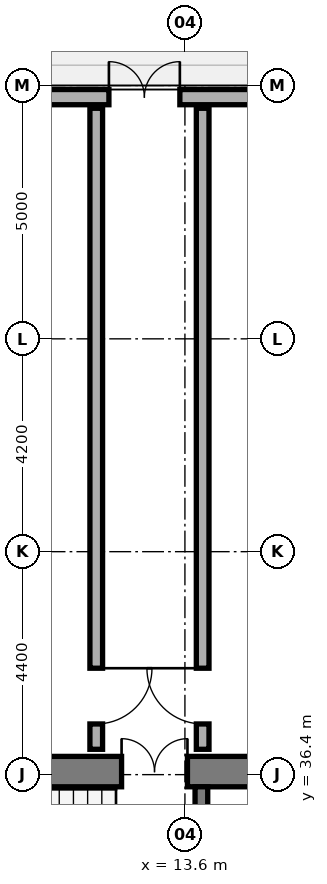
"""IFC4 building model, lengths in metres.
Left out: names, types, materials, properties, quantities, classifications, styles, units other than length and angle.
Written with IfcOpenShell. Run it as: python <this file> out.ifc"""

import sys

from ifc_helpers import new_model, si_unit, direction, frame, frame_2d, origin, place, context, subcontext, project, spatial, rectangle, extrude, element, fill, save


model = new_model("IFC4")
c1 = context("Model", 3, precision=1e-05, world=origin(), true_north=direction((0.0, 1.0)))
c2 = subcontext(c1, "Body", "Model", "MODEL_VIEW")
j1 = project(units=[si_unit("LENGTHUNIT", "METRE"), si_unit("PLANEANGLEUNIT", "RADIAN")], contexts=[c1])
p1 = place(None, origin())
s1 = spatial("IfcSite", under=j1, at=p1, CompositionType="ELEMENT")
p2 = place(p1, origin())
s2 = spatial("IfcBuilding", under=s1, at=p2, CompositionType="ELEMENT")
p3 = place(p2, origin())
s3 = spatial("IfcBuildingStorey", under=s2, at=p3, CompositionType="ELEMENT", Elevation=0.0)
p4 = place(p3, frame((6.2, 36.46, 0.0), z_axis=(0.0, 0.0, 1.0), x_axis=(1.0, 0.0, 0.0)))
e1 = element("IfcWall", 1, at=p4, inside=s3, PredefinedType="SHEAR", context=c2, shape_type="SweptSolid", body=[
    extrude(rectangle(XDim=24.8, YDim=0.6, at=frame_2d((12.4, 0.0))), origin(), (0.0, 0.0, 1.0), 5.4),
])
p5 = place(p4, frame((9.35, 0.0, 0.0)))
e2 = element("IfcOpeningElement", 2, at=p5, cuts=e1, PredefinedType="OPENING", context=c2, shape_type="SweptSolid", body=[
    extrude(rectangle(XDim=1.2, YDim=2.15, at=frame_2d((0.6, 1.075))), frame((0.0, 0.31, 0.0), z_axis=(0.0, -1.0, 0.0), x_axis=(1.0, 0.0, 0.0)), (0.0, 0.0, 1.0), 0.62),
])
p6 = place(p4, frame((6.15, 0.0, 0.0)))
e3 = element("IfcOpeningElement", 3, at=p6, cuts=e1, PredefinedType="OPENING", context=c2, shape_type="SweptSolid", body=[
    extrude(rectangle(XDim=1.3, YDim=2.15, at=frame_2d((0.65, 1.075))), frame((0.0, 0.31, 0.0), z_axis=(0.0, -1.0, 0.0), x_axis=(1.0, 0.0, 0.0)), (0.0, 0.0, 1.0), 0.62),
])
p7 = place(p4, frame((17.14, 0.0, 0.0)))
e4 = element("IfcOpeningElement", 4, at=p7, cuts=e1, PredefinedType="OPENING", context=c2, shape_type="SweptSolid", body=[
    extrude(rectangle(XDim=0.85, YDim=2.1, at=frame_2d((0.425, 1.05))), frame((0.0, 0.31, 0.0), z_axis=(0.0, -1.0, 0.0), x_axis=(1.0, 0.0, 0.0)), (0.0, 0.0, 1.0), 0.62),
])
p8 = place(p4, frame((18.983, 0.0, 0.0)))
e5 = element("IfcOpeningElement", 5, at=p8, cuts=e1, PredefinedType="OPENING", context=c2, shape_type="SweptSolid", body=[
    extrude(rectangle(XDim=1.1, YDim=2.15, at=frame_2d((0.55, 1.075))), frame((0.0, 0.31, 0.0), z_axis=(0.0, -1.0, 0.0), x_axis=(1.0, 0.0, 0.0)), (0.0, 0.0, 1.0), 0.62),
])
p9 = place(p4, frame((20.85, 0.0, 0.0)))
e6 = element("IfcOpeningElement", 6, at=p9, cuts=e1, PredefinedType="OPENING", context=c2, shape_type="SweptSolid", body=[
    extrude(rectangle(XDim=1.1, YDim=2.15, at=frame_2d((0.55, 1.075))), frame((0.0, 0.31, 0.0), z_axis=(0.0, -1.0, 0.0), x_axis=(1.0, 0.0, 0.0)), (0.0, 0.0, 1.0), 0.62),
])
p10 = place(p4, frame((22.716, 0.0, 0.0)))
e7 = element("IfcOpeningElement", 7, at=p10, cuts=e1, PredefinedType="OPENING", context=c2, shape_type="SweptSolid", body=[
    extrude(rectangle(XDim=1.1, YDim=2.15, at=frame_2d((0.55, 1.075))), frame((0.0, 0.31, 0.0), z_axis=(0.0, -1.0, 0.0), x_axis=(1.0, 0.0, 0.0)), (0.0, 0.0, 1.0), 0.62),
])
p11 = place(p3, frame((13.925, 33.0, 0.0), z_axis=(0.0, 0.0, 1.0), x_axis=(0.0, 1.0, 0.0)))
e8 = element("IfcWall", 8, at=p11, inside=s3, PredefinedType="STANDARD", context=c2, shape_type="SweptSolid", body=[
    extrude(rectangle(XDim=3.16, YDim=0.25, at=frame_2d((1.58, 0.0))), origin(), (0.0, 0.0, 1.0), 5.05),
])
p12 = place(p11, frame((0.98, 0.0, 0.0)))
e9 = element("IfcOpeningElement", 9, at=p12, cuts=e8, PredefinedType="OPENING", context=c2, shape_type="SweptSolid", body=[
    extrude(rectangle(XDim=1.1, YDim=2.15, at=frame_2d((0.55, 1.075))), frame((0.0, 0.135, 0.0), z_axis=(0.0, -1.0, 0.0), x_axis=(1.0, 0.0, 0.0)), (0.0, 0.0, 1.0), 0.27),
])
p13 = place(p3, frame((16.061, 49.77, 0.0), z_axis=(0.0, 0.0, 1.0), x_axis=(-1.0, 0.0, 0.0)))
e10 = element("IfcWall", 10, at=p13, inside=s3, PredefinedType="STANDARD", context=c2, shape_type="SweptSolid", body=[
    extrude(rectangle(XDim=8.049, YDim=0.3, at=frame_2d((4.024, 0.0))), origin(), (0.0, 0.0, 1.0), 5.05),
])
p14 = place(p13, frame((2.561, 0.0, 0.0)))
e11 = element("IfcOpeningElement", 11, at=p14, cuts=e10, PredefinedType="OPENING", context=c2, shape_type="SweptSolid", body=[
    extrude(rectangle(XDim=1.4, YDim=2.2, at=frame_2d((0.7, 1.1))), frame((0.0, 0.16, 0.0), z_axis=(0.0, -1.0, 0.0), x_axis=(1.0, 0.0, 0.0)), (0.0, 0.0, 1.0), 0.32),
])
p15 = place(p3, frame((11.85, 36.9, 0.0), z_axis=(0.0, 0.0, 1.0), x_axis=(0.0, 1.0, 0.0)))
e12 = element("IfcWall", 12, at=p15, inside=s3, PredefinedType="SOLIDWALL", context=c2, shape_type="SweptSolid", body=[
    extrude(rectangle(XDim=12.65, YDim=0.25, at=frame_2d((6.325, 0.0))), origin(), (0.0, 0.0, 1.0), 4.225),
])
p16 = place(p15, frame((0.5, 0.0, 0.0)))
e13 = element("IfcOpeningElement", 13, at=p16, cuts=e12, PredefinedType="OPENING", context=c2, shape_type="SweptSolid", body=[
    extrude(rectangle(XDim=1.1, YDim=2.15, at=frame_2d((0.55, 1.075))), frame((0.0, 0.135, 0.0), z_axis=(0.0, -1.0, 0.0), x_axis=(1.0, 0.0, 0.0)), (0.0, 0.0, 1.0), 0.27),
])
p17 = place(p3, frame((13.95, 36.9, 0.0), z_axis=(0.0, 0.0, 1.0), x_axis=(0.0, 1.0, 0.0)))
e14 = element("IfcWall", 14, at=p17, inside=s3, PredefinedType="SOLIDWALL", context=c2, shape_type="SweptSolid", body=[
    extrude(rectangle(XDim=12.65, YDim=0.25, at=frame_2d((6.325, 0.0))), origin(), (0.0, 0.0, 1.0), 4.225),
])
p18 = place(p17, frame((0.5, 0.0, 0.0)))
e15 = element("IfcOpeningElement", 15, at=p18, cuts=e14, PredefinedType="OPENING", context=c2, shape_type="SweptSolid", body=[
    extrude(rectangle(XDim=1.1, YDim=2.15, at=frame_2d((0.55, 1.075))), frame((0.0, 0.135, 0.0), z_axis=(0.0, -1.0, 0.0), x_axis=(1.0, 0.0, 0.0)), (0.0, 0.0, 1.0), 0.27),
])
p19 = place(p14, frame((1.4, 0.0, 0.0), z_axis=(0.0, 0.0, 1.0), x_axis=(-1.0, 0.0, 0.0)))
e16 = element("IfcDoor", 16, at=p19, inside=s3, OperationType="DOUBLE_DOOR_SINGLE_SWING", PredefinedType="DOOR", context=c2, shape_type="SweptSolid", body=[
    extrude(rectangle(XDim=1.4, YDim=2.2, at=frame_2d((0.7, 1.1))), frame((0.0, 0.025, 0.0), z_axis=(0.0, -1.0, 0.0), x_axis=(1.0, 0.0, 0.0)), (0.0, 0.0, 1.0), 0.05),
])
fill(e11, e16)
p20 = place(p6, origin())
e17 = element("IfcDoor", 17, at=p20, inside=s3, OperationType="DOUBLE_DOOR_SINGLE_SWING", PredefinedType="DOOR", context=c2, shape_type="SweptSolid", body=[
    extrude(rectangle(XDim=1.3, YDim=2.15, at=frame_2d((0.65, 1.075))), frame((0.0, 0.025, 0.0), z_axis=(0.0, -1.0, 0.0), x_axis=(1.0, 0.0, 0.0)), (0.0, 0.0, 1.0), 0.05),
])
fill(e3, e17)
p21 = place(p16, frame((1.1, 0.0, 0.0), z_axis=(0.0, 0.0, 1.0), x_axis=(-1.0, 0.0, 0.0)))
e18 = element("IfcDoor", 18, at=p21, inside=s3, OperationType="SINGLE_SWING_LEFT", PredefinedType="DOOR", context=c2, shape_type="SweptSolid", body=[
    extrude(rectangle(XDim=1.1, YDim=2.15, at=frame_2d((0.55, 1.075))), frame((0.0, 0.025, 0.0), z_axis=(0.0, -1.0, 0.0), x_axis=(1.0, 0.0, 0.0)), (0.0, 0.0, 1.0), 0.05),
])
fill(e13, e18)
p22 = place(p18, origin())
e19 = element("IfcDoor", 19, at=p22, inside=s3, OperationType="SINGLE_SWING_RIGHT", PredefinedType="DOOR", context=c2, shape_type="SweptSolid", body=[
    extrude(rectangle(XDim=1.1, YDim=2.15, at=frame_2d((0.55, 1.075))), frame((0.0, 0.025, 0.0), z_axis=(0.0, -1.0, 0.0), x_axis=(1.0, 0.0, 0.0)), (0.0, 0.0, 1.0), 0.05),
])
fill(e15, e19)
save(model, sys.argv[1])
